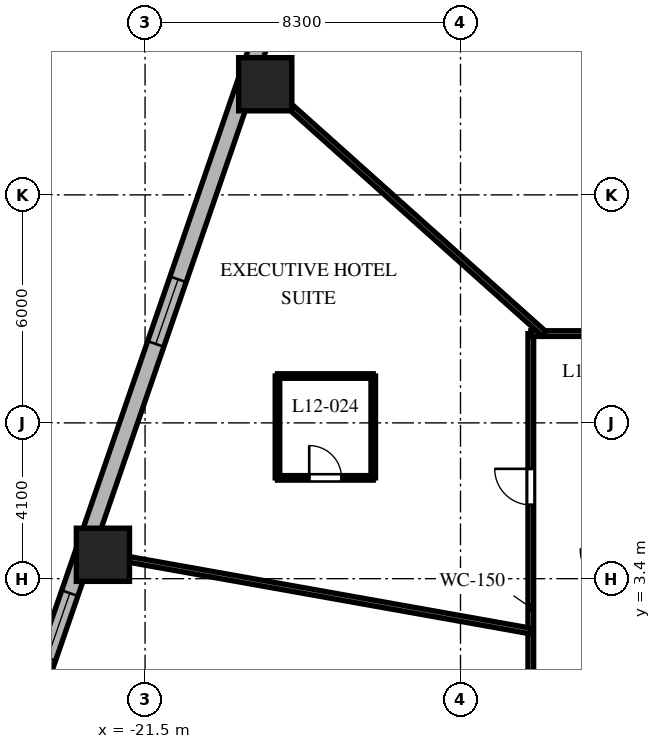
"""IFC4 building model, lengths in metres.
Left out: names, types, materials, properties, quantities, classifications, styles, units other than length and angle.
Written with IfcOpenShell. Run it as: python <this file> out.ifc"""

import sys

from ifc_helpers import new_model, si_unit, direction, frame, frame_2d, origin, origin_2d, place, context, subcontext, project, spatial, rectangle, extrude, element, fill, save


model = new_model("IFC4")
c1 = context("Model", 3, precision=1e-05, world=origin(), true_north=direction((0.0, 1.0)))
c2 = subcontext(c1, "Body", "Model", "MODEL_VIEW")
j1 = project(units=[si_unit("LENGTHUNIT", "METRE"), si_unit("PLANEANGLEUNIT", "RADIAN")], contexts=[c1])
p1 = place(None, origin())
s1 = spatial("IfcSite", under=j1, at=p1, CompositionType="ELEMENT")
p2 = place(p1, origin())
s2 = spatial("IfcBuilding", under=s1, at=p2, CompositionType="ELEMENT")
p3 = place(p2, frame((0.0, 0.0, 56.4)))
s3 = spatial("IfcBuildingStorey", under=s2, at=p3, CompositionType="ELEMENT", Elevation=56.4)
for number, where, z_axis, x_axis in (
    (1, (-18.338, 16.411, 0.0), (0.0, 0.0, 1.0), (1.0, 0.0, 0.0)),
    (2, (-22.609, 4.029, 0.0), (0.0, 0.0, 1.0), (1.0, 0.0, 0.0)),
):
    element("IfcColumn", number, at=place(p3, frame(where, z_axis=z_axis, x_axis=x_axis)), inside=s3, PredefinedType="COLUMN", context=c2, shape_type="SweptSolid", body=[
        extrude(rectangle(XDim=1.4, YDim=1.4, at=origin_2d()), origin(), (0.0, 0.0, 1.0), 3.7),
    ])
p4 = place(p3, frame((-17.39, 20.678, 0.0), z_axis=(0.0, 0.0, 1.0), x_axis=(-0.326068018294, -0.945346310854, 0.0)))
e3 = element("IfcWall", 3, at=p4, inside=s3, PredefinedType="SOLIDWALL", context=c2, shape_type="SweptSolid", body=[
    extrude(rectangle(XDim=21.793, YDim=0.45, at=frame_2d((10.896, 0.0))), origin(), (0.0, 0.0, 1.0), 3.4),
])
p5 = place(p4, frame((1.26, 0.0, 0.8)))
e4 = element("IfcOpeningElement", 4, at=p5, cuts=e3, PredefinedType="OPENING", context=c2, shape_type="SweptSolid", body=[
    extrude(rectangle(XDim=1.8, YDim=1.8, at=frame_2d((0.9, 0.9))), frame((0.0, 0.235, 0.0), z_axis=(0.0, -1.0, 0.0), x_axis=(1.0, 0.0, 0.0)), (0.0, 0.0, 1.0), 0.47),
])
p6 = place(p4, frame((9.943, 0.0, 0.8)))
e5 = element("IfcOpeningElement", 5, at=p6, cuts=e3, PredefinedType="OPENING", context=c2, shape_type="SweptSolid", body=[
    extrude(rectangle(XDim=1.8, YDim=1.8, at=frame_2d((0.9, 0.9))), frame((0.0, 0.235, 0.0), z_axis=(0.0, -1.0, 0.0), x_axis=(1.0, 0.0, 0.0)), (0.0, 0.0, 1.0), 0.47),
])
p7 = place(p4, frame((18.68, 0.0, 0.8)))
e6 = element("IfcOpeningElement", 6, at=p7, cuts=e3, PredefinedType="OPENING", context=c2, shape_type="SweptSolid", body=[
    extrude(rectangle(XDim=1.8, YDim=1.8, at=frame_2d((0.9, 0.9))), frame((0.0, 0.235, 0.0), z_axis=(0.0, -1.0, 0.0), x_axis=(1.0, 0.0, 0.0)), (0.0, 0.0, 1.0), 0.47),
])
p8 = place(p3, frame((-11.35, -9.85, 0.0), z_axis=(0.0, 0.0, 1.0), x_axis=(0.0, 1.0, 0.0)))
e7 = element("IfcWall", 7, at=p8, inside=s3, PredefinedType="PARTITIONING", context=c2, shape_type="SweptSolid", body=[
    extrude(rectangle(XDim=19.7, YDim=0.15, at=frame_2d((9.85, 0.0))), origin(), (0.0, 0.0, 1.0), 2.84),
])
p9 = place(p8, frame((15.191, 0.0, 0.0)))
e8 = element("IfcOpeningElement", 8, at=p9, cuts=e7, PredefinedType="OPENING", context=c2, shape_type="SweptSolid", body=[
    extrude(rectangle(XDim=0.95, YDim=2.03, at=frame_2d((0.475, 1.015))), frame((0.0, 0.085, 0.0), z_axis=(0.0, -1.0, 0.0), x_axis=(1.0, 0.0, 0.0)), (0.0, 0.0, 1.0), 0.17),
])
p10 = place(p8, frame((8.838, 0.0, 0.0)))
e9 = element("IfcOpeningElement", 9, at=p10, cuts=e7, PredefinedType="OPENING", context=c2, shape_type="SweptSolid", body=[
    extrude(rectangle(XDim=0.95, YDim=2.03, at=frame_2d((0.475, 1.015))), frame((0.0, 0.085, 0.0), z_axis=(0.0, -1.0, 0.0), x_axis=(1.0, 0.0, 0.0)), (0.0, 0.0, 1.0), 0.17),
])
p11 = place(p8, frame((4.704, 0.0, 0.0)))
e10 = element("IfcOpeningElement", 10, at=p11, cuts=e7, PredefinedType="OPENING", context=c2, shape_type="SweptSolid", body=[
    extrude(rectangle(XDim=0.95, YDim=2.03, at=frame_2d((0.475, 1.015))), frame((0.0, 0.085, 0.0), z_axis=(0.0, -1.0, 0.0), x_axis=(1.0, 0.0, 0.0)), (0.0, 0.0, 1.0), 0.17),
])
p12 = place(p8, frame((1.462, 0.0, 0.0)))
e11 = element("IfcOpeningElement", 11, at=p12, cuts=e7, PredefinedType="OPENING", context=c2, shape_type="SweptSolid", body=[
    extrude(rectangle(XDim=0.95, YDim=2.03, at=frame_2d((0.475, 1.015))), frame((0.0, 0.085, 0.0), z_axis=(0.0, -1.0, 0.0), x_axis=(1.0, 0.0, 0.0)), (0.0, 0.0, 1.0), 0.17),
])
p13 = place(p3, frame((-11.35, 9.85, 0.0), z_axis=(0.0, 0.0, 1.0), x_axis=(1.0, 0.0, 0.0)))
e12 = element("IfcWall", 12, at=p13, inside=s3, PredefinedType="PARTITIONING", context=c2, shape_type="SweptSolid", body=[
    extrude(rectangle(XDim=22.7, YDim=0.15, at=frame_2d((11.35, 0.0))), origin(), (0.0, 0.0, 1.0), 2.84),
])
p14 = place(p13, frame((17.225, 0.0, 0.0)))
e13 = element("IfcOpeningElement", 13, at=p14, cuts=e12, PredefinedType="OPENING", context=c2, shape_type="SweptSolid", body=[
    extrude(rectangle(XDim=0.95, YDim=2.03, at=frame_2d((0.475, 1.015))), frame((0.0, 0.085, 0.0), z_axis=(0.0, -1.0, 0.0), x_axis=(1.0, 0.0, 0.0)), (0.0, 0.0, 1.0), 0.17),
])
p15 = place(p13, frame((10.444, 0.0, 0.0)))
e14 = element("IfcOpeningElement", 14, at=p15, cuts=e12, PredefinedType="OPENING", context=c2, shape_type="SweptSolid", body=[
    extrude(rectangle(XDim=0.95, YDim=2.03, at=frame_2d((0.475, 1.015))), frame((0.0, 0.085, 0.0), z_axis=(0.0, -1.0, 0.0), x_axis=(1.0, 0.0, 0.0)), (0.0, 0.0, 1.0), 0.17),
])
p16 = place(p13, frame((3.369, 0.0, 0.0)))
e15 = element("IfcOpeningElement", 15, at=p16, cuts=e12, PredefinedType="OPENING", context=c2, shape_type="SweptSolid", body=[
    extrude(rectangle(XDim=0.95, YDim=2.03, at=frame_2d((0.475, 1.015))), frame((0.0, 0.085, 0.0), z_axis=(0.0, -1.0, 0.0), x_axis=(1.0, 0.0, 0.0)), (0.0, 0.0, 1.0), 0.17),
])
p17 = place(p3, frame((-11.007, 9.85, 0.0), z_axis=(0.0, 0.0, 1.0), x_axis=(-0.745177305978, 0.666866390407, 0.0)))
e16 = element("IfcWall", 16, at=p17, inside=s3, PredefinedType="PARTITIONING", context=c2, shape_type="SweptSolid", body=[
    extrude(rectangle(XDim=10.375, YDim=0.15, at=frame_2d((5.188, 0.0))), origin(), (0.0, 0.0, 1.0), 2.54),
])
p18 = place(p3, frame((-11.35, 2.023, 0.0), z_axis=(0.0, 0.0, 1.0), x_axis=(-0.984493741877, 0.17541970301, 0.0)))
e17 = element("IfcWall", 17, at=p18, inside=s3, PredefinedType="PARTITIONING", context=c2, shape_type="SweptSolid", body=[
    extrude(rectangle(XDim=11.937, YDim=0.15, at=frame_2d((5.969, 0.0))), origin(), (0.0, 0.0, 1.0), 2.54),
])
p19 = place(p3, frame((-18.016, 6.053, 0.0), z_axis=(0.0, 0.0, 1.0), x_axis=(1.0, 0.0, 0.0)))
e18 = element("IfcWall", 18, at=p19, inside=s3, PredefinedType="PARTITIONING", context=c2, shape_type="SweptSolid", body=[
    extrude(rectangle(XDim=2.52, YDim=0.12, at=frame_2d((1.26, 0.0))), origin(), (0.0, 0.0, 1.0), 2.972),
])
p20 = place(p19, frame((0.835, 0.0, 0.0)))
e19 = element("IfcOpeningElement", 19, at=p20, cuts=e18, PredefinedType="OPENING", context=c2, shape_type="SweptSolid", body=[
    extrude(rectangle(XDim=0.85, YDim=2.03, at=frame_2d((0.425, 1.015))), frame((0.0, 0.07, 0.0), z_axis=(0.0, -1.0, 0.0), x_axis=(1.0, 0.0, 0.0)), (0.0, 0.0, 1.0), 0.14),
])
p21 = place(p3, frame((-15.496, 6.053, 0.0), z_axis=(0.0, 0.0, 1.0), x_axis=(0.0, 1.0, 0.0)))
e20 = element("IfcWall", 20, at=p21, inside=s3, PredefinedType="PARTITIONING", context=c2, shape_type="SweptSolid", body=[
    extrude(rectangle(XDim=2.68, YDim=0.12, at=frame_2d((1.34, 0.0))), origin(), (0.0, 0.0, 1.0), 3.4),
])
p22 = place(p3, frame((-15.496, 8.733, 0.0), z_axis=(0.0, 0.0, 1.0), x_axis=(-1.0, 0.0, 0.0)))
e21 = element("IfcWall", 21, at=p22, inside=s3, PredefinedType="PARTITIONING", context=c2, shape_type="SweptSolid", body=[
    extrude(rectangle(XDim=2.52, YDim=0.12, at=frame_2d((1.26, 0.0))), origin(), (0.0, 0.0, 1.0), 2.972),
])
p23 = place(p3, frame((-18.016, 8.733, 0.0), z_axis=(0.0, 0.0, 1.0), x_axis=(0.0, -1.0, 0.0)))
e22 = element("IfcWall", 22, at=p23, inside=s3, PredefinedType="PARTITIONING", context=c2, shape_type="SweptSolid", body=[
    extrude(rectangle(XDim=2.68, YDim=0.12, at=frame_2d((1.34, 0.0))), origin(), (0.0, 0.0, 1.0), 2.972),
])
p24 = place(p6, origin())
e23 = element("IfcWindow", 23, at=p24, inside=s3, PartitioningType="SINGLE_PANEL", PredefinedType="WINDOW", context=c2, shape_type="SweptSolid", body=[
    extrude(rectangle(XDim=1.8, YDim=1.8, at=frame_2d((0.9, 0.9))), frame((0.0, 0.03, 0.0), z_axis=(0.0, -1.0, 0.0), x_axis=(1.0, 0.0, 0.0)), (0.0, 0.0, 1.0), 0.06),
])
fill(e5, e23)
p25 = place(p7, origin())
e24 = element("IfcWindow", 24, at=p25, inside=s3, PartitioningType="SINGLE_PANEL", PredefinedType="WINDOW", context=c2, shape_type="SweptSolid", body=[
    extrude(rectangle(XDim=1.8, YDim=1.8, at=frame_2d((0.9, 0.9))), frame((0.0, 0.03, 0.0), z_axis=(0.0, -1.0, 0.0), x_axis=(1.0, 0.0, 0.0)), (0.0, 0.0, 1.0), 0.06),
])
fill(e6, e24)
p26 = place(p9, origin())
e25 = element("IfcDoor", 25, at=p26, inside=s3, OperationType="SINGLE_SWING_RIGHT", PredefinedType="DOOR", context=c2, shape_type="SweptSolid", body=[
    extrude(rectangle(XDim=0.95, YDim=2.03, at=frame_2d((0.475, 1.015))), frame((0.0, 0.025, 0.0), z_axis=(0.0, -1.0, 0.0), x_axis=(1.0, 0.0, 0.0)), (0.0, 0.0, 1.0), 0.05),
])
fill(e8, e25)
p27 = place(p20, origin())
e26 = element("IfcDoor", 26, at=p27, inside=s3, OperationType="SINGLE_SWING_LEFT", PredefinedType="DOOR", context=c2, shape_type="SweptSolid", body=[
    extrude(rectangle(XDim=0.85, YDim=2.03, at=frame_2d((0.425, 1.015))), frame((0.0, 0.025, 0.0), z_axis=(0.0, -1.0, 0.0), x_axis=(1.0, 0.0, 0.0)), (0.0, 0.0, 1.0), 0.05),
])
fill(e19, e26)
save(model, sys.argv[1])
